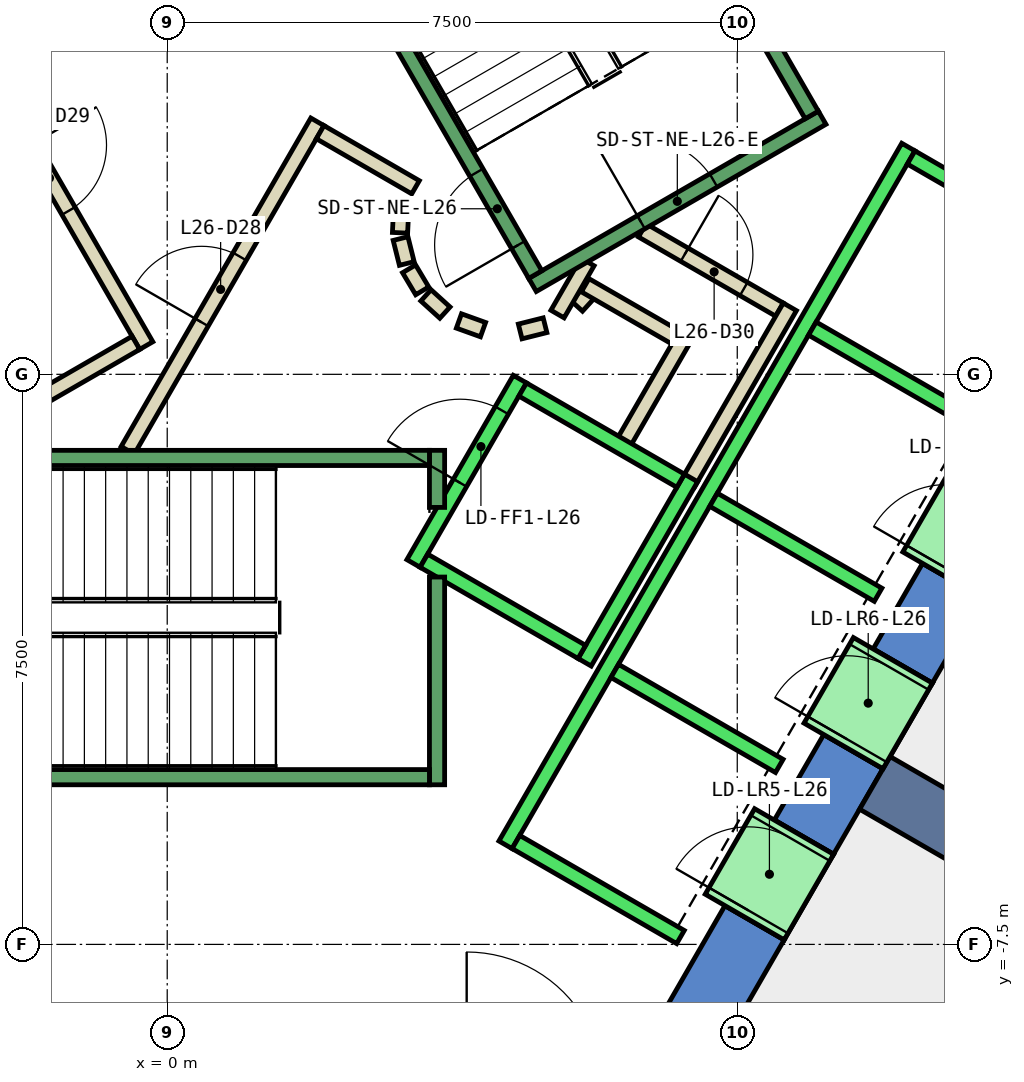
"""IFC4 building model, lengths in metres.
Left out: names, types, materials, properties, quantities, classifications, styles, units other than length and angle.
Written with IfcOpenShell. Run it as: python <this file> out.ifc"""

import sys

from ifc_helpers import new_model, si_unit, direction, frame, frame_2d, origin, place, context, subcontext, project, spatial, polyline, rectangle, outline, extrude, element, fill, save


model = new_model("IFC4")
c1 = context("Model", 3, precision=1e-05, world=origin(), true_north=direction((0.0, 1.0)))
c2 = subcontext(c1, "Body", "Model", "MODEL_VIEW")
j1 = project(units=[si_unit("LENGTHUNIT", "METRE"), si_unit("PLANEANGLEUNIT", "RADIAN")], contexts=[c1])
p1 = place(None, origin())
s1 = spatial("IfcSite", under=j1, at=p1, CompositionType="ELEMENT")
p2 = place(p1, origin())
s2 = spatial("IfcBuilding", under=s1, at=p2, CompositionType="ELEMENT")
p3 = place(p2, frame((0.0, 0.0, 120.2)))
s3 = spatial("IfcBuildingStorey", under=s2, at=p3, CompositionType="ELEMENT", Elevation=120.2)
p4 = place(p3, frame((0.0, 0.0, -0.4)))
e1 = element("IfcWall", 1, at=p4, inside=s3, PredefinedType="SHEAR", context=c2, shape_type="SweptSolid", body=[
    extrude(outline(polyline([(8.517, 11.748), (7.738, 11.298), (12.817, 2.5), (13.856, 2.5), (8.517, 11.748)])), origin(), (0.0, 0.0, 1.0), 4.2),
])
p5 = place(p3, frame((0.0, 0.0, -0.4)))
e2 = element("IfcWall", 2, at=p5, inside=s3, PredefinedType="SHEAR", context=c2, shape_type="SweptSolid", body=[
    extrude(outline(polyline([(8.117, -7.44), (7.338, -6.99), (6.409, -8.6), (6.928, -9.5), (8.117, -7.44)])), origin(), (0.0, 0.0, 1.0), 4.2),
])
p6 = place(p3, frame((0.0, 0.0, -0.4)))
e3 = element("IfcWall", 3, at=p6, inside=s3, PredefinedType="SHEAR", context=c2, shape_type="SweptSolid", body=[
    extrude(outline(polyline([(9.417, -5.189), (8.638, -4.739), (7.988, -5.864), (8.767, -6.314), (9.417, -5.189)])), origin(), (0.0, 0.0, 1.0), 4.2),
])
p7 = place(p3, frame((0.0, 0.0, -0.4)))
e4 = element("IfcWall", 4, at=p7, inside=s3, PredefinedType="SHEAR", context=c2, shape_type="SweptSolid", body=[
    extrude(outline(polyline([(10.717, -2.937), (9.938, -2.487), (9.288, -3.613), (10.067, -4.063), (10.717, -2.937)])), origin(), (0.0, 0.0, 1.0), 4.2),
])
p8 = place(p3, frame((0.0, 0.0, 3.6)))
e5 = element("IfcWall", 5, at=p8, inside=s3, PredefinedType="SHEAR", context=c2, shape_type="SweptSolid", body=[
    extrude(outline(polyline([(8.767, -6.314), (7.988, -5.864), (7.338, -6.99), (8.117, -7.44), (8.767, -6.314)])), origin(), (0.0, 0.0, 1.0), 0.2),
])
p9 = place(p3, frame((0.0, 0.0, 3.6)))
e6 = element("IfcWall", 6, at=p9, inside=s3, PredefinedType="SHEAR", context=c2, shape_type="SweptSolid", body=[
    extrude(outline(polyline([(10.067, -4.063), (9.288, -3.613), (8.638, -4.739), (9.417, -5.189), (10.067, -4.063)])), origin(), (0.0, 0.0, 1.0), 0.2),
])
p10 = place(p3, frame((0.0, 0.0, 3.6)))
e7 = element("IfcWall", 7, at=p10, inside=s3, PredefinedType="SHEAR", context=c2, shape_type="SweptSolid", body=[
    extrude(outline(polyline([(11.367, -1.811), (10.588, -1.361), (9.938, -2.487), (10.717, -2.937), (11.367, -1.811)])), origin(), (0.0, 0.0, 1.0), 0.2),
])
p11 = place(p3, frame((9.31, -5.375, -0.4), z_axis=(0.0, 0.0, 1.0), x_axis=(0.866017533419, -0.500013631625, 0.0)))
e8 = element("IfcWall", 8, at=p11, inside=s3, PredefinedType="SHEAR", context=c2, shape_type="SweptSolid", body=[
    extrude(rectangle(XDim=9.0, YDim=0.8, at=frame_2d((4.5, 0.0))), origin(), (0.0, 0.0, 1.0), 4.2),
])
p12 = place(p3, frame((5.39, 0.898, 0.0), z_axis=(0.0, 0.0, 1.0), x_axis=(0.673828488714, 0.738887791073, 0.0)))
e9 = element("IfcWall", 9, at=p12, inside=s3, PredefinedType="PARTITIONING", context=c2, shape_type="SweptSolid", body=[
    extrude(rectangle(XDim=0.263, YDim=0.2, at=frame_2d((0.131, 0.0))), origin(), (0.0, 0.0, 1.0), 3.8),
])
p13 = place(p3, frame((5.499, 1.172, 0.0), z_axis=(0.0, 0.0, 1.0), x_axis=(0.866333505267, -0.499465972466, 0.0)))
e10 = element("IfcWall", 10, at=p13, inside=s3, PredefinedType="PARTITIONING", context=c2, shape_type="SweptSolid", body=[
    extrude(rectangle(XDim=1.374, YDim=0.2, at=frame_2d((0.687, 0.0))), origin(), (0.0, 0.0, 1.0), 3.8),
])
p14 = place(p3, frame((6.826, 0.522, 0.0), z_axis=(0.0, 0.0, 1.0), x_axis=(-0.500016722714, -0.866015748706, 0.0)))
e11 = element("IfcWall", 11, at=p14, inside=s3, PredefinedType="PARTITIONING", context=c2, shape_type="SweptSolid", body=[
    extrude(rectangle(XDim=1.7, YDim=0.2, at=frame_2d((0.85, 0.0))), origin(), (0.0, 0.0, 1.0), 3.8),
])
p15 = place(p3, frame((6.25, 1.894, 0.0), z_axis=(0.0, 0.0, 1.0), x_axis=(0.866043184279, -0.499969202016, 0.0)))
e12 = element("IfcWall", 12, at=p15, inside=s3, PredefinedType="PARTITIONING", context=c2, shape_type="SweptSolid", body=[
    extrude(rectangle(XDim=2.084, YDim=0.2, at=frame_2d((1.042, 0.0))), origin(), (0.0, 0.0, 1.0), 3.8),
])
p16 = place(p15, frame((0.642, 0.0, 0.0)))
e13 = element("IfcOpeningElement", 13, at=p16, cuts=e12, PredefinedType="OPENING", context=c2, shape_type="SweptSolid", body=[
    extrude(rectangle(XDim=0.9, YDim=2.1, at=frame_2d((0.45, 1.05))), frame((0.0, 0.11, 0.0), z_axis=(0.0, -1.0, 0.0), x_axis=(1.0, 0.0, 0.0)), (0.0, 0.0, 1.0), 0.22),
])
p17 = place(p3, frame((8.192, 0.888, 0.0), z_axis=(0.0, 0.0, 1.0), x_axis=(-0.499940625693, -0.866059680843, 0.0)))
e14 = element("IfcWall", 14, at=p17, inside=s3, PredefinedType="PARTITIONING", context=c2, shape_type="SweptSolid", body=[
    extrude(rectangle(XDim=2.68, YDim=0.2, at=frame_2d((1.34, 0.0))), origin(), (0.0, 0.0, 1.0), 3.8),
])
p18 = place(p3, frame((5.135, 0.793, 0.0), z_axis=(0.0, 0.0, 1.0), x_axis=(0.499526442893, 0.866298639529, 0.0)))
e15 = element("IfcWall", 15, at=p18, inside=s3, PredefinedType="PARTITIONING", context=c2, shape_type="SweptSolid", body=[
    extrude(rectangle(XDim=0.791, YDim=0.2, at=frame_2d((0.396, 0.0))), origin(), (0.0, 0.0, 1.0), 3.8),
])
p19 = place(p3, frame((-0.52, -1.0, 0.0), z_axis=(0.0, 0.0, 1.0), x_axis=(0.50011622646, 0.865958290007, 0.0)))
e16 = element("IfcWall", 16, at=p19, inside=s3, PredefinedType="PARTITIONING", context=c2, shape_type="SweptSolid", body=[
    extrude(rectangle(XDim=4.991, YDim=0.2, at=frame_2d((2.496, 0.0))), origin(), (0.0, 0.0, 1.0), 3.8),
])
p20 = place(p19, frame((1.945, 0.0, 0.0)))
e17 = element("IfcOpeningElement", 17, at=p20, cuts=e16, PredefinedType="OPENING", context=c2, shape_type="SweptSolid", body=[
    extrude(rectangle(XDim=1.0, YDim=2.1, at=frame_2d((0.5, 1.05))), frame((0.0, 0.11, 0.0), z_axis=(0.0, -1.0, 0.0), x_axis=(1.0, 0.0, 0.0)), (0.0, 0.0, 1.0), 0.22),
])
p21 = place(p3, frame((2.012, 3.186, 0.0), z_axis=(0.0, 0.0, 1.0), x_axis=(0.865891012941, -0.500232699559, 0.0)))
e18 = element("IfcWall", 18, at=p21, inside=s3, PredefinedType="PARTITIONING", context=c2, shape_type="SweptSolid", body=[
    extrude(rectangle(XDim=1.449, YDim=0.2, at=frame_2d((0.725, 0.0))), origin(), (0.0, 0.0, 1.0), 3.8),
])
p22 = place(p3, frame((3.079, 2.199, 0.0), z_axis=(0.0, 0.0, 1.0), x_axis=(-0.047771483479, -0.998858290933, 0.0)))
e19 = element("IfcWall", 19, at=p22, inside=s3, PredefinedType="PARTITIONING", context=c2, shape_type="SweptSolid", body=[
    extrude(rectangle(XDim=0.337, YDim=0.2, at=frame_2d((0.169, 0.0))), origin(), (0.0, 0.0, 1.0), 3.8),
])
p23 = place(p3, frame((3.07, 1.786, 0.0), z_axis=(0.0, 0.0, 1.0), x_axis=(0.242705583207, -0.970099994784, 0.0)))
e20 = element("IfcWall", 20, at=p23, inside=s3, PredefinedType="PARTITIONING", context=c2, shape_type="SweptSolid", body=[
    extrude(rectangle(XDim=0.338, YDim=0.2, at=frame_2d((0.169, 0.0))), origin(), (0.0, 0.0, 1.0), 3.8),
])
for number, where, z_axis, x_axis in (
    (21, (3.182, 1.388, 0.0), (0.0, 0.0, 1.0), (0.512, -0.859, 0.0)),
    (22, (3.404, 1.039, 0.0), (0.0, 0.0, 1.0), (0.74, -0.672, 0.0)),
):
    element("IfcWall", number, at=place(p3, frame(where, z_axis=z_axis, x_axis=x_axis)), inside=s3, PredefinedType="PARTITIONING", context=c2, shape_type="SweptSolid", body=[
        extrude(rectangle(XDim=0.338, YDim=0.2, at=frame_2d((0.169, 0.0))), origin(), (0.0, 0.0, 1.0), 3.8),
    ])
p24 = place(p3, frame((3.838, 0.702, 0.0), z_axis=(0.0, 0.0, 1.0), x_axis=(0.941035081519, -0.338308993895, 0.0)))
e23 = element("IfcWall", 23, at=p24, inside=s3, PredefinedType="PARTITIONING", context=c2, shape_type="SweptSolid", body=[
    extrude(rectangle(XDim=0.337, YDim=0.2, at=frame_2d((0.168, 0.0))), origin(), (0.0, 0.0, 1.0), 3.8),
])
p25 = place(p3, frame((4.644, 0.564, 0.0), z_axis=(0.0, 0.0, 1.0), x_axis=(0.969929076366, 0.243387729394, 0.0)))
e24 = element("IfcWall", 24, at=p25, inside=s3, PredefinedType="PARTITIONING", context=c2, shape_type="SweptSolid", body=[
    extrude(rectangle(XDim=0.337, YDim=0.2, at=frame_2d((0.168, 0.0))), origin(), (0.0, 0.0, 1.0), 3.8),
])
p26 = place(p3, frame((-2.771, 4.7, 0.0), z_axis=(0.0, 0.0, 1.0), x_axis=(0.499969479948, -0.866043023828, 0.0)))
e25 = element("IfcWall", 25, at=p26, inside=s3, PredefinedType="PARTITIONING", context=c2, shape_type="SweptSolid", body=[
    extrude(rectangle(XDim=4.99, YDim=0.2, at=frame_2d((2.495, 0.0))), origin(), (0.0, 0.0, 1.0), 3.8),
])
p27 = place(p26, frame((1.945, 0.0, 0.0)))
e26 = element("IfcOpeningElement", 26, at=p27, cuts=e25, PredefinedType="OPENING", context=c2, shape_type="SweptSolid", body=[
    extrude(rectangle(XDim=1.0, YDim=2.1, at=frame_2d((0.5, 1.05))), frame((0.0, 0.11, 0.0), z_axis=(0.0, -1.0, 0.0), x_axis=(1.0, 0.0, 0.0)), (0.0, 0.0, 1.0), 0.22),
])
p28 = place(p3, frame((-0.412, 0.414, 0.0), z_axis=(0.0, 0.0, 1.0), x_axis=(-0.866017369001, -0.500013916395, 0.0)))
e27 = element("IfcWall", 27, at=p28, inside=s3, PredefinedType="PARTITIONING", context=c2, shape_type="SweptSolid", body=[
    extrude(rectangle(XDim=1.45, YDim=0.2, at=frame_2d((0.725, 0.0))), origin(), (0.0, 0.0, 1.0), 3.8),
])
p29 = place(p3, frame((12.401, -7.621, 0.0), z_axis=(0.0, 0.0, 1.0), x_axis=(-0.499983724212, -0.866034800411, 0.0)))
e28 = element("IfcWall", 28, at=p29, inside=s3, PredefinedType="PARTITIONING", context=c2, shape_type="SweptSolid", body=[
    extrude(rectangle(XDim=9.302, YDim=0.2, at=frame_2d((4.651, 0.0))), origin(), (0.0, 0.0, 1.0), 3.8),
])
p30 = place(p3, frame((3.24, -2.488, 0.0), z_axis=(0.0, 0.0, 1.0), x_axis=(0.49994636267, 0.866056369097, 0.0)))
e29 = element("IfcWall", 29, at=p30, inside=s3, PredefinedType="STANDARD", context=c2, shape_type="SweptSolid", body=[
    extrude(rectangle(XDim=2.8, YDim=0.2, at=frame_2d((1.4, 0.0))), origin(), (0.0, 0.0, 1.0), 3.8),
])
p31 = place(p30, frame((1.225, 0.0, 0.0)))
e30 = element("IfcOpeningElement", 30, at=p31, cuts=e29, PredefinedType="OPENING", context=c2, shape_type="SweptSolid", body=[
    extrude(rectangle(XDim=1.1, YDim=2.1, at=frame_2d((0.55, 1.05))), frame((0.0, 0.11, 0.0), z_axis=(0.0, -1.0, 0.0), x_axis=(1.0, 0.0, 0.0)), (0.0, 0.0, 1.0), 0.22),
])
p32 = place(p3, frame((5.492, -3.788, 0.0), z_axis=(0.0, 0.0, 1.0), x_axis=(0.500011755427, 0.866018616679, 0.0)))
e31 = element("IfcWall", 31, at=p32, inside=s3, PredefinedType="STANDARD", context=c2, shape_type="SweptSolid", body=[
    extrude(rectangle(XDim=2.8, YDim=0.2, at=frame_2d((1.4, 0.0))), origin(), (0.0, 0.0, 1.0), 3.8),
])
p33 = place(p3, frame((3.377, -2.452, 0.0), z_axis=(0.0, 0.0, 1.0), x_axis=(0.865955154139, -0.50012165622, 0.0)))
e32 = element("IfcWall", 32, at=p33, inside=s3, PredefinedType="STANDARD", context=c2, shape_type="SweptSolid", body=[
    extrude(rectangle(XDim=2.4, YDim=0.2, at=frame_2d((1.2, 0.0))), origin(), (0.0, 0.0, 1.0), 3.8),
])
p34 = place(p3, frame((4.677, -0.2, 0.0), z_axis=(0.0, 0.0, 1.0), x_axis=(0.865973769406, -0.500089422704, 0.0)))
e33 = element("IfcWall", 33, at=p34, inside=s3, PredefinedType="STANDARD", context=c2, shape_type="SweptSolid", body=[
    extrude(rectangle(XDim=2.399, YDim=0.2, at=frame_2d((1.2, 0.0))), origin(), (0.0, 0.0, 1.0), 3.8),
])
p35 = place(p3, frame((4.451, -6.19, 0.0), z_axis=(0.0, 0.0, 1.0), x_axis=(0.50000090737, 0.866024879913, 0.0)))
e34 = element("IfcWall", 34, at=p35, inside=s3, PredefinedType="STANDARD", context=c2, shape_type="SweptSolid", body=[
    extrude(rectangle(XDim=10.6, YDim=0.2, at=frame_2d((5.3, 0.0))), origin(), (0.0, 0.0, 1.0), 3.8),
])
for number, where, z_axis, x_axis in (
    (35, (4.588, -6.153, 0.0), (0.0, 0.0, 1.0), (0.866, -0.5, 0.0)),
    (36, (5.888, -3.902, 0.0), (0.0, 0.0, 1.0), (0.866, -0.5, 0.0)),
    (37, (7.188, -1.65, 0.0), (0.0, 0.0, 1.0), (0.866, -0.5, 0.0)),
    (38, (8.488, 0.602, 0.0), (0.0, 0.0, 1.0), (0.866, -0.5, 0.0)),
):
    element("IfcWall", number, at=place(p3, frame(where, z_axis=z_axis, x_axis=x_axis)), inside=s3, PredefinedType="STANDARD", context=c2, shape_type="SweptSolid", body=[
        extrude(rectangle(XDim=2.5, YDim=0.2, at=frame_2d((1.25, 0.0))), origin(), (0.0, 0.0, 1.0), 3.8),
    ])
p36 = place(p3, frame((9.788, 2.853, 0.0), z_axis=(0.0, 0.0, 1.0), x_axis=(0.865998541277, -0.500046524342, 0.0)))
e39 = element("IfcWall", 39, at=p36, inside=s3, PredefinedType="STANDARD", context=c2, shape_type="SweptSolid", body=[
    extrude(rectangle(XDim=2.5, YDim=0.2, at=frame_2d((1.25, 0.0))), origin(), (0.0, 0.0, 1.0), 3.8),
])
p37 = place(p3, frame((7.598, -7.14, 0.0), z_axis=(0.0, 0.0, 1.0), x_axis=(0.500362116554, 0.865816234728, 0.0)))
e40 = element("IfcWall", 40, at=p37, inside=s3, PredefinedType="STANDARD", context=c2, shape_type="SweptSolid", body=[
    extrude(rectangle(XDim=1.299, YDim=1.2, at=frame_2d((0.65, 0.0))), origin(), (0.0, 0.0, 1.0), 2.4),
])
p38 = place(p37, frame((0.1, 0.0, 0.0)))
e41 = element("IfcOpeningElement", 41, at=p38, cuts=e40, PredefinedType="OPENING", context=c2, shape_type="SweptSolid", body=[
    extrude(rectangle(XDim=1.1, YDim=2.3, at=frame_2d((0.55, 1.15))), frame((0.0, 0.61, 0.0), z_axis=(0.0, -1.0, 0.0), x_axis=(1.0, 0.0, 0.0)), (0.0, 0.0, 1.0), 1.22),
])
p39 = place(p3, frame((8.898, -4.889, 0.0), z_axis=(0.0, 0.0, 1.0), x_axis=(0.500036693733, 0.866004217611, 0.0)))
e42 = element("IfcWall", 42, at=p39, inside=s3, PredefinedType="STANDARD", context=c2, shape_type="SweptSolid", body=[
    extrude(rectangle(XDim=1.3, YDim=1.2, at=frame_2d((0.65, 0.0))), origin(), (0.0, 0.0, 1.0), 2.4),
])
p40 = place(p39, frame((0.1, 0.0, 0.0)))
e43 = element("IfcOpeningElement", 43, at=p40, cuts=e42, PredefinedType="OPENING", context=c2, shape_type="SweptSolid", body=[
    extrude(rectangle(XDim=1.1, YDim=2.3, at=frame_2d((0.55, 1.15))), frame((0.0, 0.61, 0.0), z_axis=(0.0, -1.0, 0.0), x_axis=(1.0, 0.0, 0.0)), (0.0, 0.0, 1.0), 1.22),
])
p41 = place(p3, frame((10.198, -2.637, 0.0), z_axis=(0.0, 0.0, 1.0), x_axis=(0.49989585183, 0.866085525409, 0.0)))
e44 = element("IfcWall", 44, at=p41, inside=s3, PredefinedType="STANDARD", context=c2, shape_type="SweptSolid", body=[
    extrude(rectangle(XDim=1.3, YDim=1.2, at=frame_2d((0.65, 0.0))), origin(), (0.0, 0.0, 1.0), 2.4),
])
p42 = place(p41, frame((0.1, 0.0, 0.0)))
e45 = element("IfcOpeningElement", 45, at=p42, cuts=e44, PredefinedType="OPENING", context=c2, shape_type="SweptSolid", body=[
    extrude(rectangle(XDim=1.1, YDim=2.3, at=frame_2d((0.55, 1.15))), frame((0.0, 0.61, 0.0), z_axis=(0.0, -1.0, 0.0), x_axis=(1.0, 0.0, 0.0)), (0.0, 0.0, 1.0), 1.22),
])
p43 = place(p3, frame((3.55, -2.667, 0.0), z_axis=(0.0, 0.0, 1.0), x_axis=(0.0, -1.0, 0.0)))
e46 = element("IfcWall", 46, at=p43, inside=s3, PredefinedType="STANDARD", context=c2, shape_type="SweptSolid", body=[
    extrude(rectangle(XDim=2.733, YDim=0.2, at=frame_2d((1.366, 0.0))), origin(), (0.0, 0.0, 1.0), 3.8),
])
p44 = place(p3, frame((3.55, -1.0, 0.0), z_axis=(0.0, 0.0, 1.0), x_axis=(0.0, -1.0, 0.0)))
e47 = element("IfcWall", 47, at=p44, inside=s3, PredefinedType="STANDARD", context=c2, shape_type="SweptSolid", body=[
    extrude(rectangle(XDim=0.751, YDim=0.2, at=frame_2d((0.375, 0.0))), origin(), (0.0, 0.0, 1.0), 3.8),
])
p45 = place(p3, frame((-3.45, -1.1, 0.0), z_axis=(0.0, 0.0, 1.0), x_axis=(1.0, 0.0, 0.0)))
e48 = element("IfcWall", 48, at=p45, inside=s3, PredefinedType="STANDARD", context=c2, shape_type="SweptSolid", body=[
    extrude(rectangle(XDim=6.9, YDim=0.2, at=frame_2d((3.45, 0.0))), origin(), (0.0, 0.0, 1.0), 3.8),
])
p46 = place(p45, frame((0.45, 0.0, 0.0)))
e49 = element("IfcOpeningElement", 49, at=p46, cuts=e48, PredefinedType="OPENING", context=c2, shape_type="SweptSolid", body=[
    extrude(rectangle(XDim=1.1, YDim=2.2, at=frame_2d((0.55, 1.1))), frame((0.0, 0.11, 0.0), z_axis=(0.0, -1.0, 0.0), x_axis=(1.0, 0.0, 0.0)), (0.0, 0.0, 1.0), 0.22),
])
p47 = place(p3, frame((-3.45, -5.3, 0.0), z_axis=(0.0, 0.0, 1.0), x_axis=(1.0, 0.0, 0.0)))
e50 = element("IfcWall", 50, at=p47, inside=s3, PredefinedType="STANDARD", context=c2, shape_type="SweptSolid", body=[
    extrude(rectangle(XDim=6.9, YDim=0.2, at=frame_2d((3.45, 0.0))), origin(), (0.0, 0.0, 1.0), 3.8),
])
p48 = place(p3, frame((4.806, 1.176, 0.0), z_axis=(0.0, 0.0, 1.0), x_axis=(0.866059941101, 0.499940174841, 0.0)))
e51 = element("IfcWall", 51, at=p48, inside=s3, PredefinedType="STANDARD", context=c2, shape_type="SweptSolid", body=[
    extrude(rectangle(XDim=4.4, YDim=0.2, at=frame_2d((2.2, 0.0))), origin(), (0.0, 0.0, 1.0), 3.8),
])
p49 = place(p48, frame((1.65, 0.0, 0.0)))
e52 = element("IfcOpeningElement", 52, at=p49, cuts=e51, PredefinedType="OPENING", context=c2, shape_type="SweptSolid", body=[
    extrude(rectangle(XDim=1.1, YDim=2.2, at=frame_2d((0.55, 1.1))), frame((0.0, 0.11, 0.0), z_axis=(0.0, -1.0, 0.0), x_axis=(1.0, 0.0, 0.0)), (0.0, 0.0, 1.0), 0.22),
])
p50 = place(p3, frame((4.843, 1.312, 0.0), z_axis=(0.0, 0.0, 1.0), x_axis=(-0.499963383562, 0.866046543262, 0.0)))
e53 = element("IfcWall", 53, at=p50, inside=s3, PredefinedType="STANDARD", context=c2, shape_type="SweptSolid", body=[
    extrude(rectangle(XDim=6.9, YDim=0.2, at=frame_2d((3.45, 0.0))), origin(), (0.0, 0.0, 1.0), 3.8),
])
p51 = place(p50, frame((0.45, 0.0, 0.0)))
e54 = element("IfcOpeningElement", 54, at=p51, cuts=e53, PredefinedType="OPENING", context=c2, shape_type="SweptSolid", body=[
    extrude(rectangle(XDim=1.1, YDim=2.2, at=frame_2d((0.55, 1.1))), frame((0.0, 0.11, 0.0), z_axis=(0.0, -1.0, 0.0), x_axis=(1.0, 0.0, 0.0)), (0.0, 0.0, 1.0), 0.22),
])
p52 = place(p3, frame((8.48, 3.412, 0.0), z_axis=(0.0, 0.0, 1.0), x_axis=(-0.499978703459, 0.866037698999, 0.0)))
e55 = element("IfcWall", 55, at=p52, inside=s3, PredefinedType="STANDARD", context=c2, shape_type="SweptSolid", body=[
    extrude(rectangle(XDim=6.9, YDim=0.2, at=frame_2d((3.45, 0.0))), origin(), (0.0, 0.0, 1.0), 3.8),
])
p53 = place(p3, frame((-1.393, 7.288, 0.0), z_axis=(0.0, 0.0, 1.0), x_axis=(-0.499963383562, -0.866046543262, 0.0)))
e56 = element("IfcWall", 56, at=p53, inside=s3, PredefinedType="STANDARD", context=c2, shape_type="SweptSolid", body=[
    extrude(rectangle(XDim=6.9, YDim=0.2, at=frame_2d((3.45, 0.0))), origin(), (0.0, 0.0, 1.0), 3.8),
])
p54 = place(p53, frame((0.45, 0.0, 0.0)))
e57 = element("IfcOpeningElement", 57, at=p54, cuts=e56, PredefinedType="OPENING", context=c2, shape_type="SweptSolid", body=[
    extrude(rectangle(XDim=1.1, YDim=2.2, at=frame_2d((0.55, 1.1))), frame((0.0, 0.11, 0.0), z_axis=(0.0, -1.0, 0.0), x_axis=(1.0, 0.0, 0.0)), (0.0, 0.0, 1.0), 0.22),
])
p55 = place(p20, origin())
e58 = element("IfcDoor", 58, at=p55, inside=s3, OperationType="SINGLE_SWING_LEFT", PredefinedType="DOOR", context=c2, shape_type="SweptSolid", body=[
    extrude(rectangle(XDim=1.0, YDim=2.1, at=frame_2d((0.5, 1.05))), frame((0.0, 0.025, 0.0), z_axis=(0.0, -1.0, 0.0), x_axis=(1.0, 0.0, 0.0)), (0.0, 0.0, 1.0), 0.05),
])
fill(e17, e58)
p56 = place(p27, origin())
e59 = element("IfcDoor", 59, at=p56, inside=s3, OperationType="SINGLE_SWING_RIGHT", PredefinedType="DOOR", context=c2, shape_type="SweptSolid", body=[
    extrude(rectangle(XDim=1.0, YDim=2.1, at=frame_2d((0.5, 1.05))), frame((0.0, 0.025, 0.0), z_axis=(0.0, -1.0, 0.0), x_axis=(1.0, 0.0, 0.0)), (0.0, 0.0, 1.0), 0.05),
])
fill(e26, e59)
p57 = place(p16, origin())
e60 = element("IfcDoor", 60, at=p57, inside=s3, OperationType="SINGLE_SWING_LEFT", PredefinedType="DOOR", context=c2, shape_type="SweptSolid", body=[
    extrude(rectangle(XDim=0.9, YDim=2.1, at=frame_2d((0.45, 1.05))), frame((0.0, 0.025, 0.0), z_axis=(0.0, -1.0, 0.0), x_axis=(1.0, 0.0, 0.0)), (0.0, 0.0, 1.0), 0.05),
])
fill(e13, e60)
p58 = place(p38, origin())
e61 = element("IfcDoor", 61, at=p58, inside=s3, OperationType="SLIDING_TO_LEFT", PredefinedType="DOOR", context=c2, shape_type="SweptSolid", body=[
    extrude(rectangle(XDim=1.1, YDim=2.3, at=frame_2d((0.55, 1.15))), frame((0.0, 0.025, 0.0), z_axis=(0.0, -1.0, 0.0), x_axis=(1.0, 0.0, 0.0)), (0.0, 0.0, 1.0), 0.05),
])
fill(e41, e61)
p59 = place(p40, origin())
e62 = element("IfcDoor", 62, at=p59, inside=s3, OperationType="SLIDING_TO_LEFT", PredefinedType="DOOR", context=c2, shape_type="SweptSolid", body=[
    extrude(rectangle(XDim=1.1, YDim=2.3, at=frame_2d((0.55, 1.15))), frame((0.0, 0.025, 0.0), z_axis=(0.0, -1.0, 0.0), x_axis=(1.0, 0.0, 0.0)), (0.0, 0.0, 1.0), 0.05),
])
fill(e43, e62)
p60 = place(p31, origin())
e63 = element("IfcDoor", 63, at=p60, inside=s3, OperationType="SLIDING_TO_LEFT", PredefinedType="DOOR", context=c2, shape_type="SweptSolid", body=[
    extrude(rectangle(XDim=1.1, YDim=2.1, at=frame_2d((0.55, 1.05))), frame((0.0, 0.025, 0.0), z_axis=(0.0, -1.0, 0.0), x_axis=(1.0, 0.0, 0.0)), (0.0, 0.0, 1.0), 0.05),
])
fill(e30, e63)
p61 = place(p51, origin())
e64 = element("IfcDoor", 64, at=p61, inside=s3, OperationType="SINGLE_SWING_LEFT", PredefinedType="DOOR", context=c2, shape_type="SweptSolid", body=[
    extrude(rectangle(XDim=1.1, YDim=2.2, at=frame_2d((0.55, 1.1))), frame((0.0, 0.025, 0.0), z_axis=(0.0, -1.0, 0.0), x_axis=(1.0, 0.0, 0.0)), (0.0, 0.0, 1.0), 0.05),
])
fill(e54, e64)
p62 = place(p49, origin())
e65 = element("IfcDoor", 65, at=p62, inside=s3, OperationType="SINGLE_SWING_LEFT", PredefinedType="DOOR", context=c2, shape_type="SweptSolid", body=[
    extrude(rectangle(XDim=1.1, YDim=2.2, at=frame_2d((0.55, 1.1))), frame((0.0, 0.025, 0.0), z_axis=(0.0, -1.0, 0.0), x_axis=(1.0, 0.0, 0.0)), (0.0, 0.0, 1.0), 0.05),
])
fill(e52, e65)
save(model, sys.argv[1])
